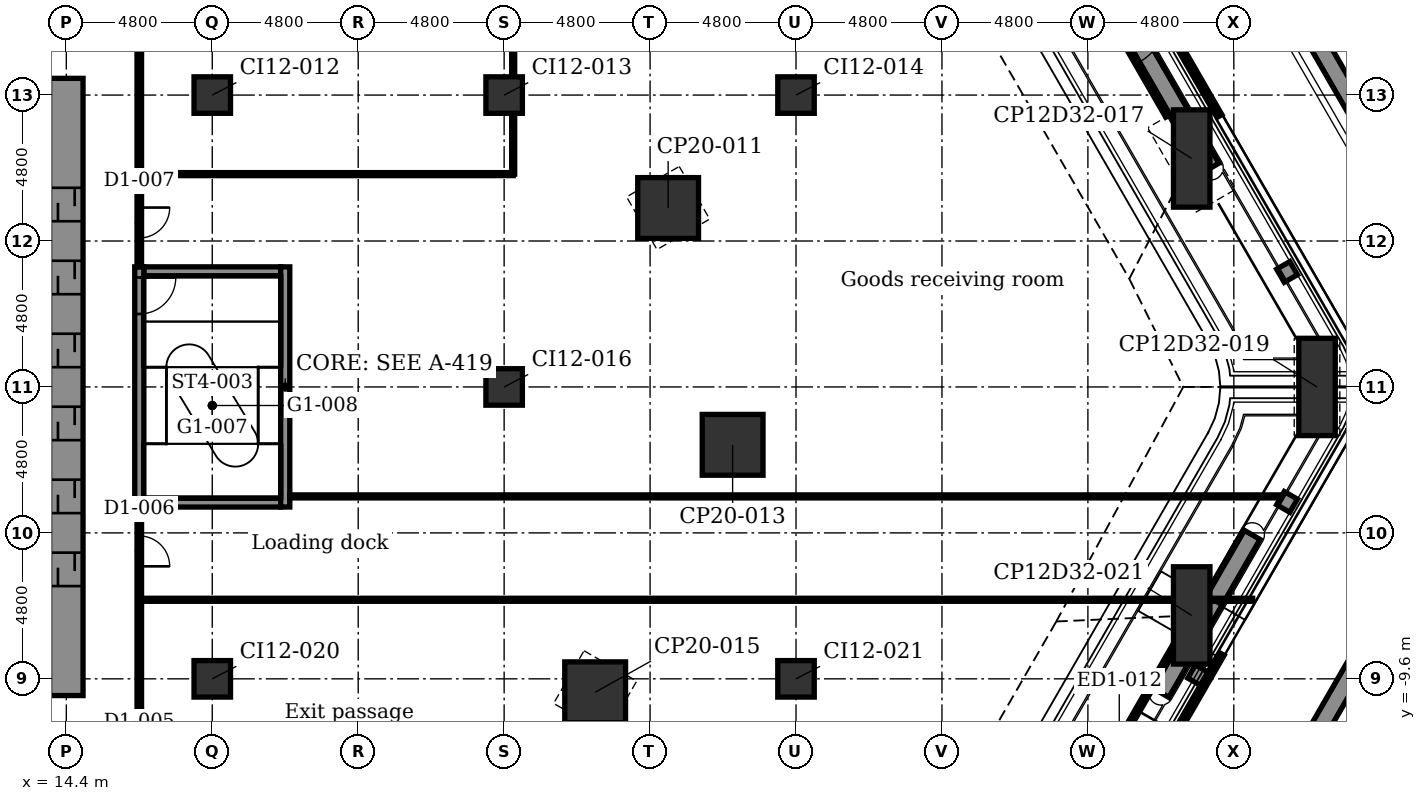
"""IFC4 building model, lengths in metres.
Left out: names, types, materials, properties, quantities, classifications, styles, units other than length and angle.
Written with IfcOpenShell. Run it as: python <this file> out.ifc"""

import sys

from ifc_helpers import new_model, si_unit, direction, frame, frame_2d, origin, origin_2d, place, context, subcontext, project, spatial, rectangle, extrude, element, fill, save


model = new_model("IFC4")
c1 = context("Model", 3, precision=1e-05, world=origin(), true_north=direction((0.0, 1.0)))
c2 = subcontext(c1, "Body", "Model", "MODEL_VIEW")
j1 = project(units=[si_unit("LENGTHUNIT", "METRE"), si_unit("PLANEANGLEUNIT", "RADIAN")], contexts=[c1])
p1 = place(None, origin())
s1 = spatial("IfcSite", under=j1, at=p1, CompositionType="ELEMENT")
p2 = place(p1, origin())
s2 = spatial("IfcBuilding", under=s1, at=p2, CompositionType="ELEMENT")
p3 = place(p2, origin())
s3 = spatial("IfcBuildingStorey", under=s2, at=p3, CompositionType="ELEMENT", Elevation=0.0)
for number, where, z_axis, x_axis in (
    (1, (51.414, 7.514, -0.4), (0.0, 0.0, 1.0), (0.866, 0.5, 0.0)),
    (2, (55.536, 0.0, -0.4), (0.0, 0.0, 1.0), (1.0, 0.0, 0.0)),
    (3, (51.414, -7.514, -0.4), (0.0, 0.0, 1.0), (0.5, 0.866, 0.0)),
):
    element("IfcColumn", number, at=place(p3, frame(where, z_axis=z_axis, x_axis=x_axis)), inside=s3, PredefinedType="COLUMN", context=c2, shape_type="SweptSolid", body=[
        extrude(rectangle(XDim=1.2, YDim=3.2, at=origin_2d()), origin(), (0.0, 0.0, 1.0), 7.1),
    ])
for number, where, z_axis, x_axis in (
    (4, (34.194, 5.885, -0.4), (0.0, 0.0, 1.0), (0.866, 0.5, 0.0)),
    (5, (36.315, -1.904, -0.4), (0.0, 0.0, 1.0), (1.0, 0.0, 0.0)),
    (6, (31.794, -10.042, -0.4), (0.0, 0.0, 1.0), (0.5, 0.866, 0.0)),
):
    element("IfcColumn", number, at=place(p3, frame(where, z_axis=z_axis, x_axis=x_axis)), inside=s3, PredefinedType="COLUMN", context=c2, shape_type="SweptSolid", body=[
        extrude(rectangle(XDim=2.0, YDim=2.0, at=origin_2d()), origin(), (0.0, 0.0, 1.0), 7.1),
    ])
for number, where, z_axis, x_axis in (
    (7, (19.2, -9.6, -0.4), (0.0, 0.0, 1.0), (1.0, 0.0, 0.0)),
    (8, (19.2, 9.6, -0.4), (0.0, 0.0, 1.0), (1.0, 0.0, 0.0)),
    (9, (28.8, 0.0, -0.4), (0.0, 0.0, 1.0), (1.0, 0.0, 0.0)),
    (10, (28.8, 9.6, -0.4), (0.0, 0.0, 1.0), (1.0, 0.0, 0.0)),
    (11, (38.4, -9.6, -0.4), (0.0, 0.0, 1.0), (1.0, 0.0, 0.0)),
    (12, (38.4, 9.6, -0.4), (0.0, 0.0, 1.0), (1.0, 0.0, 0.0)),
):
    element("IfcColumn", number, at=place(p3, frame(where, z_axis=z_axis, x_axis=x_axis)), inside=s3, PredefinedType="COLUMN", context=c2, shape_type="SweptSolid", body=[
        extrude(rectangle(XDim=1.2, YDim=1.2, at=origin_2d()), origin(), (0.0, 0.0, 1.0), 7.1),
    ])
for number, where, z_axis, x_axis in (
    (13, (16.95, -3.8, -0.4), (0.0, 0.0, 1.0), (1.0, 0.0, 0.0)),
    (14, (16.95, 3.8, -0.4), (0.0, 0.0, 1.0), (1.0, 0.0, 0.0)),
):
    element("IfcWall", number, at=place(p3, frame(where, z_axis=z_axis, x_axis=x_axis)), inside=s3, PredefinedType="STANDARD", context=c2, shape_type="SweptSolid", body=[
        extrude(rectangle(XDim=4.5, YDim=0.3, at=frame_2d((2.25, 0.0))), origin(), (0.0, 0.0, 1.0), 7.1),
    ])
p4 = place(p3, frame((14.4, -10.15, -0.4), z_axis=(0.0, 0.0, 1.0), x_axis=(0.0, 1.0, 0.0)))
e15 = element("IfcWall", 15, at=p4, inside=s3, PredefinedType="SHEAR", context=c2, shape_type="SweptSolid", body=[
    extrude(rectangle(XDim=20.3, YDim=1.1, at=frame_2d((10.15, 0.0))), origin(), (0.0, 0.0, 1.0), 7.1),
])
p5 = place(p4, frame((3.6, 0.0, 0.4)))
e16 = element("IfcOpeningElement", 16, at=p5, cuts=e15, PredefinedType="OPENING", context=c2, shape_type="SweptSolid", body=[
    extrude(rectangle(XDim=1.1, YDim=2.1, at=frame_2d((0.55, 1.05))), frame((0.0, 0.56, 0.0), z_axis=(0.0, -1.0, 0.0), x_axis=(1.0, 0.0, 0.0)), (0.0, 0.0, 1.0), 1.12),
])
p6 = place(p4, frame((6.0, 0.0, 0.4)))
e17 = element("IfcOpeningElement", 17, at=p6, cuts=e15, PredefinedType="OPENING", context=c2, shape_type="SweptSolid", body=[
    extrude(rectangle(XDim=1.1, YDim=2.1, at=frame_2d((0.55, 1.05))), frame((0.0, 0.56, 0.0), z_axis=(0.0, -1.0, 0.0), x_axis=(1.0, 0.0, 0.0)), (0.0, 0.0, 1.0), 1.12),
])
p7 = place(p4, frame((8.4, 0.0, 0.4)))
e18 = element("IfcOpeningElement", 18, at=p7, cuts=e15, PredefinedType="OPENING", context=c2, shape_type="SweptSolid", body=[
    extrude(rectangle(XDim=1.1, YDim=2.1, at=frame_2d((0.55, 1.05))), frame((0.0, 0.56, 0.0), z_axis=(0.0, -1.0, 0.0), x_axis=(1.0, 0.0, 0.0)), (0.0, 0.0, 1.0), 1.12),
])
p8 = place(p4, frame((10.8, 0.0, 0.4)))
e19 = element("IfcOpeningElement", 19, at=p8, cuts=e15, PredefinedType="OPENING", context=c2, shape_type="SweptSolid", body=[
    extrude(rectangle(XDim=1.1, YDim=2.1, at=frame_2d((0.55, 1.05))), frame((0.0, 0.56, 0.0), z_axis=(0.0, -1.0, 0.0), x_axis=(1.0, 0.0, 0.0)), (0.0, 0.0, 1.0), 1.12),
])
p9 = place(p4, frame((13.2, 0.0, 0.4)))
e20 = element("IfcOpeningElement", 20, at=p9, cuts=e15, PredefinedType="OPENING", context=c2, shape_type="SweptSolid", body=[
    extrude(rectangle(XDim=1.1, YDim=2.1, at=frame_2d((0.55, 1.05))), frame((0.0, 0.56, 0.0), z_axis=(0.0, -1.0, 0.0), x_axis=(1.0, 0.0, 0.0)), (0.0, 0.0, 1.0), 1.12),
])
p10 = place(p4, frame((15.6, 0.0, 0.4)))
e21 = element("IfcOpeningElement", 21, at=p10, cuts=e15, PredefinedType="OPENING", context=c2, shape_type="SweptSolid", body=[
    extrude(rectangle(XDim=1.1, YDim=2.1, at=frame_2d((0.55, 1.05))), frame((0.0, 0.56, 0.0), z_axis=(0.0, -1.0, 0.0), x_axis=(1.0, 0.0, 0.0)), (0.0, 0.0, 1.0), 1.12),
])
p11 = place(p3, frame((16.8, -3.95, -0.4), z_axis=(0.0, 0.0, 1.0), x_axis=(0.0, 1.0, 0.0)))
e22 = element("IfcWall", 22, at=p11, inside=s3, PredefinedType="STANDARD", context=c2, shape_type="SweptSolid", body=[
    extrude(rectangle(XDim=7.9, YDim=0.3, at=frame_2d((3.95, 0.0))), origin(), (0.0, 0.0, 1.0), 7.1),
])
p12 = place(p11, frame((6.35, 0.0, 0.4)))
e23 = element("IfcOpeningElement", 23, at=p12, cuts=e22, PredefinedType="OPENING", context=c2, shape_type="SweptSolid", body=[
    extrude(rectangle(XDim=1.2, YDim=2.1, at=frame_2d((0.6, 1.05))), frame((0.0, 0.16, 0.0), z_axis=(0.0, -1.0, 0.0), x_axis=(1.0, 0.0, 0.0)), (0.0, 0.0, 1.0), 0.32),
])
p13 = place(p3, frame((21.6, -3.95, -0.4), z_axis=(0.0, 0.0, 1.0), x_axis=(0.0, 1.0, 0.0)))
e24 = element("IfcWall", 24, at=p13, inside=s3, PredefinedType="STANDARD", context=c2, shape_type="SweptSolid", body=[
    extrude(rectangle(XDim=7.9, YDim=0.3, at=frame_2d((3.95, 0.0))), origin(), (0.0, 0.0, 1.0), 7.1),
])
p14 = place(p3, frame((47.433, 14.45, 0.0), z_axis=(0.0, 0.0, 1.0), x_axis=(0.500002207027, -0.866024129553, 0.0)))
e25 = element("IfcWall", 25, at=p14, inside=s3, PredefinedType="PARTITIONING", context=c2, shape_type="SweptSolid", body=[
    extrude(rectangle(XDim=6.396, YDim=0.16, at=frame_2d((3.198, 0.0))), origin(), (0.0, 0.0, 1.0), 6.7),
])
p15 = place(p14, frame((1.998, 0.0, 0.0)))
e26 = element("IfcOpeningElement", 26, at=p15, cuts=e25, PredefinedType="OPENING", context=c2, shape_type="SweptSolid", body=[
    extrude(rectangle(XDim=2.4, YDim=2.4, at=frame_2d((1.2, 1.2))), frame((0.0, 0.09, 0.0), z_axis=(0.0, -1.0, 0.0), x_axis=(1.0, 0.0, 0.0)), (0.0, 0.0, 1.0), 0.18),
])
p16 = place(p3, frame((51.131, -8.045, 0.0), z_axis=(0.0, 0.0, 1.0), x_axis=(-0.49999513524, -0.866028212437, 0.0)))
e27 = element("IfcWall", 27, at=p16, inside=s3, PredefinedType="PARTITIONING", context=c2, shape_type="SweptSolid", body=[
    extrude(rectangle(XDim=8.396, YDim=0.16, at=frame_2d((4.198, 0.0))), origin(), (0.0, 0.0, 1.0), 6.7),
])
p17 = place(p16, frame((2.998, 0.0, 0.0)))
e28 = element("IfcOpeningElement", 28, at=p17, cuts=e27, PredefinedType="OPENING", context=c2, shape_type="SweptSolid", body=[
    extrude(rectangle(XDim=2.4, YDim=2.4, at=frame_2d((1.2, 1.2))), frame((0.0, 0.09, 0.0), z_axis=(0.0, -1.0, 0.0), x_axis=(1.0, 0.0, 0.0)), (0.0, 0.0, 1.0), 0.18),
])
p18 = place(p3, frame((48.289, 15.927, 0.0), z_axis=(0.0, 0.0, 1.0), x_axis=(0.500001755459, -0.866024390267, 0.0)))
e29 = element("IfcWall", 29, at=p18, inside=s3, PredefinedType="PARTITIONING", context=c2, shape_type="SweptSolid", body=[
    extrude(rectangle(XDim=8.096, YDim=0.16, at=frame_2d((4.048, 0.0))), origin(), (0.0, 0.0, 1.0), 6.7),
])
p19 = place(p18, frame((2.848, 0.0, 0.0)))
e30 = element("IfcOpeningElement", 30, at=p19, cuts=e29, PredefinedType="OPENING", context=c2, shape_type="SweptSolid", body=[
    extrude(rectangle(XDim=2.4, YDim=2.4, at=frame_2d((1.2, 1.2))), frame((0.0, 0.09, 0.0), z_axis=(0.0, -1.0, 0.0), x_axis=(1.0, 0.0, 0.0)), (0.0, 0.0, 1.0), 0.18),
])
p20 = place(p3, frame((52.411, -8.787, 0.0), z_axis=(0.0, 0.0, 1.0), x_axis=(-0.499996941814, -0.866027169422, 0.0)))
e31 = element("IfcWall", 31, at=p20, inside=s3, PredefinedType="PARTITIONING", context=c2, shape_type="SweptSolid", body=[
    extrude(rectangle(XDim=8.392, YDim=0.16, at=frame_2d((4.196, 0.0))), origin(), (0.0, 0.0, 1.0), 6.7),
])
p21 = place(p20, frame((2.996, 0.0, 0.0)))
e32 = element("IfcOpeningElement", 32, at=p21, cuts=e31, PredefinedType="OPENING", context=c2, shape_type="SweptSolid", body=[
    extrude(rectangle(XDim=2.4, YDim=2.4, at=frame_2d((1.2, 1.2))), frame((0.0, 0.09, 0.0), z_axis=(0.0, -1.0, 0.0), x_axis=(1.0, 0.0, 0.0)), (0.0, 0.0, 1.0), 0.18),
])
for number, where, z_axis, x_axis in (
    (33, (49.052, 12.406, 7.0), (0.0, 0.0, 1.0), (0.5, -0.866, 0.0)),
    (34, (53.405, -4.865, 7.0), (0.0, 0.0, 1.0), (-0.5, -0.866, 0.0)),
):
    element("IfcWall", number, at=place(p3, frame(where, z_axis=z_axis, x_axis=x_axis)), inside=s3, PredefinedType="USERDEFINED", context=c2, shape_type="SweptSolid", body=[
        extrude(rectangle(XDim=6.0, YDim=0.6, at=frame_2d((3.0, 0.0))), origin(), (0.0, 0.0, 1.0), 0.7),
    ])
for number, where, z_axis, x_axis in (
    (35, (52.077, 17.365, 0.0), (0.0, 0.0, 1.0), (0.5, -0.866, 0.0)),
    (36, (60.577, -2.643, 0.0), (0.0, 0.0, 1.0), (-0.5, -0.866, 0.0)),
):
    element("IfcWall", number, at=place(p3, frame(where, z_axis=z_axis, x_axis=x_axis)), inside=s3, PredefinedType="USERDEFINED", context=c2, shape_type="SweptSolid", body=[
        extrude(rectangle(XDim=12.0, YDim=0.6, at=frame_2d((6.0, 0.0))), origin(), (0.0, 0.0, 1.0), 0.7),
    ])
for number, where, z_axis, x_axis in (
    (37, (54.425, 3.999, 0.0), (0.0, 0.0, 1.0), (0.5, -0.866, 0.0)),
    (38, (54.675, -3.565, 0.0), (0.0, 0.0, 1.0), (-0.5, -0.866, 0.0)),
):
    element("IfcWall", number, at=place(p3, frame(where, z_axis=z_axis, x_axis=x_axis)), inside=s3, PredefinedType="SOLIDWALL", context=c2, shape_type="SweptSolid", body=[
        extrude(rectangle(XDim=0.5, YDim=0.5, at=frame_2d((0.25, 0.0))), origin(), (0.0, 0.0, 1.0), 6.4),
    ])
p22 = place(p3, frame((51.753, -9.268, 0.0), z_axis=(0.0, 0.0, 1.0), x_axis=(-0.500131122175, -0.865949687125, 0.0)))
e39 = element("IfcWall", 39, at=p22, inside=s3, PredefinedType="SOLIDWALL", context=c2, shape_type="SweptSolid", body=[
    extrude(rectangle(XDim=0.5, YDim=0.5, at=frame_2d((0.25, 0.0))), origin(), (0.0, 0.0, 1.0), 6.4),
])
p23 = place(p3, frame((29.097, 7.0, 0.0), z_axis=(0.0, 0.0, 1.0), x_axis=(0.0, 1.0, 0.0)))
e40 = element("IfcWall", 40, at=p23, inside=s3, PredefinedType="PARTITIONING", context=c2, shape_type="SweptSolid", body=[
    extrude(rectangle(XDim=41.911, YDim=0.1, at=frame_2d((20.956, 0.0))), origin(), (0.0, 0.0, 1.0), 6.7),
])
p24 = place(p3, frame((16.8, -14.8, 0.0), z_axis=(0.0, 0.0, 1.0), x_axis=(0.0, 1.0, 0.0)))
e41 = element("IfcWall", 41, at=p24, inside=s3, PredefinedType="PARTITIONING", context=c2, shape_type="SweptSolid", body=[
    extrude(rectangle(XDim=10.85, YDim=0.15, at=frame_2d((5.425, 0.0))), origin(), (0.0, 0.0, 1.0), 6.7),
])
p25 = place(p24, frame((1.9, 0.0, 0.0)))
e42 = element("IfcOpeningElement", 42, at=p25, cuts=e41, PredefinedType="OPENING", context=c2, shape_type="SweptSolid", body=[
    extrude(rectangle(XDim=1.0, YDim=2.1, at=frame_2d((0.5, 1.05))), frame((0.0, 0.085, 0.0), z_axis=(0.0, -1.0, 0.0), x_axis=(1.0, 0.0, 0.0)), (0.0, 0.0, 1.0), 0.17),
])
p26 = place(p24, frame((8.9, 0.0, 0.0)))
e43 = element("IfcOpeningElement", 43, at=p26, cuts=e41, PredefinedType="OPENING", context=c2, shape_type="SweptSolid", body=[
    extrude(rectangle(XDim=1.0, YDim=2.1, at=frame_2d((0.5, 1.05))), frame((0.0, 0.085, 0.0), z_axis=(0.0, -1.0, 0.0), x_axis=(1.0, 0.0, 0.0)), (0.0, 0.0, 1.0), 0.17),
])
p27 = place(p3, frame((16.8, 3.95, 0.0), z_axis=(0.0, 0.0, 1.0), x_axis=(0.0, 1.0, 0.0)))
e44 = element("IfcWall", 44, at=p27, inside=s3, PredefinedType="PARTITIONING", context=c2, shape_type="SweptSolid", body=[
    extrude(rectangle(XDim=12.05, YDim=0.15, at=frame_2d((6.025, 0.0))), origin(), (0.0, 0.0, 1.0), 6.7),
])
p28 = place(p27, frame((0.95, 0.0, 0.0)))
e45 = element("IfcOpeningElement", 45, at=p28, cuts=e44, PredefinedType="OPENING", context=c2, shape_type="SweptSolid", body=[
    extrude(rectangle(XDim=1.0, YDim=2.1, at=frame_2d((0.5, 1.05))), frame((0.0, 0.085, 0.0), z_axis=(0.0, -1.0, 0.0), x_axis=(1.0, 0.0, 0.0)), (0.0, 0.0, 1.0), 0.17),
])
p29 = place(p27, frame((8.55, 0.0, 0.0)))
e46 = element("IfcOpeningElement", 46, at=p29, cuts=e44, PredefinedType="OPENING", context=c2, shape_type="SweptSolid", body=[
    extrude(rectangle(XDim=1.0, YDim=2.1, at=frame_2d((0.5, 1.05))), frame((0.0, 0.085, 0.0), z_axis=(0.0, -1.0, 0.0), x_axis=(1.0, 0.0, 0.0)), (0.0, 0.0, 1.0), 0.17),
])
p30 = place(p3, frame((16.8, -7.0, 0.0), z_axis=(0.0, 0.0, 1.0), x_axis=(1.0, 0.0, 0.0)))
e47 = element("IfcWall", 47, at=p30, inside=s3, PredefinedType="PARTITIONING", context=c2, shape_type="SweptSolid", body=[
    extrude(rectangle(XDim=36.62, YDim=0.1, at=frame_2d((18.31, 0.0))), origin(), (0.0, 0.0, 1.0), 6.7),
])
p31 = place(p3, frame((21.75, -3.6, 0.0), z_axis=(0.0, 0.0, 1.0), x_axis=(1.0, 0.0, 0.0)))
e48 = element("IfcWall", 48, at=p31, inside=s3, PredefinedType="PARTITIONING", context=c2, shape_type="SweptSolid", body=[
    extrude(rectangle(XDim=32.588, YDim=0.1, at=frame_2d((16.294, 0.0))), origin(), (0.0, 0.0, 1.0), 6.7),
])
p32 = place(p3, frame((16.8, 7.0, 0.0), z_axis=(0.0, 0.0, 1.0), x_axis=(1.0, 0.0, 0.0)))
e49 = element("IfcWall", 49, at=p32, inside=s3, PredefinedType="PARTITIONING", context=c2, shape_type="SweptSolid", body=[
    extrude(rectangle(XDim=12.297, YDim=0.1, at=frame_2d((6.148, 0.0))), origin(), (0.0, 0.0, 1.0), 6.7),
])
p33 = place(p15, origin())
e50 = element("IfcDoor", 50, at=p33, inside=s3, OperationType="DOUBLE_DOOR_DOUBLE_SWING", PredefinedType="DOOR", context=c2, shape_type="SweptSolid", body=[
    extrude(rectangle(XDim=2.4, YDim=2.4, at=frame_2d((1.2, 1.2))), frame((0.0, 0.025, 0.0), z_axis=(0.0, -1.0, 0.0), x_axis=(1.0, 0.0, 0.0)), (0.0, 0.0, 1.0), 0.05),
])
fill(e26, e50)
p34 = place(p17, origin())
e51 = element("IfcDoor", 51, at=p34, inside=s3, OperationType="DOUBLE_DOOR_DOUBLE_SWING", PredefinedType="DOOR", context=c2, shape_type="SweptSolid", body=[
    extrude(rectangle(XDim=2.4, YDim=2.4, at=frame_2d((1.2, 1.2))), frame((0.0, 0.025, 0.0), z_axis=(0.0, -1.0, 0.0), x_axis=(1.0, 0.0, 0.0)), (0.0, 0.0, 1.0), 0.05),
])
fill(e28, e51)
p35 = place(p26, frame((1.0, 0.0, 0.0), z_axis=(0.0, 0.0, 1.0), x_axis=(-1.0, 0.0, 0.0)))
e52 = element("IfcDoor", 52, at=p35, inside=s3, OperationType="SINGLE_SWING_LEFT", PredefinedType="DOOR", context=c2, shape_type="SweptSolid", body=[
    extrude(rectangle(XDim=1.0, YDim=2.1, at=frame_2d((0.5, 1.05))), frame((0.0, 0.025, 0.0), z_axis=(0.0, -1.0, 0.0), x_axis=(1.0, 0.0, 0.0)), (0.0, 0.0, 1.0), 0.05),
])
fill(e43, e52)
p36 = place(p28, frame((1.0, 0.0, 0.0), z_axis=(0.0, 0.0, 1.0), x_axis=(-1.0, 0.0, 0.0)))
e53 = element("IfcDoor", 53, at=p36, inside=s3, OperationType="SINGLE_SWING_RIGHT", PredefinedType="DOOR", context=c2, shape_type="SweptSolid", body=[
    extrude(rectangle(XDim=1.0, YDim=2.1, at=frame_2d((0.5, 1.05))), frame((0.0, 0.025, 0.0), z_axis=(0.0, -1.0, 0.0), x_axis=(1.0, 0.0, 0.0)), (0.0, 0.0, 1.0), 0.05),
])
fill(e45, e53)
p37 = place(p5, origin())
e54 = element("IfcDoor", 54, at=p37, inside=s3, OperationType="DOUBLE_DOOR_SLIDING", PredefinedType="DOOR", context=c2, shape_type="SweptSolid", body=[
    extrude(rectangle(XDim=1.1, YDim=2.1, at=frame_2d((0.55, 1.05))), frame((0.0, 0.025, 0.0), z_axis=(0.0, -1.0, 0.0), x_axis=(1.0, 0.0, 0.0)), (0.0, 0.0, 1.0), 0.05),
])
fill(e16, e54)
p38 = place(p6, origin())
e55 = element("IfcDoor", 55, at=p38, inside=s3, OperationType="DOUBLE_DOOR_SLIDING", PredefinedType="DOOR", context=c2, shape_type="SweptSolid", body=[
    extrude(rectangle(XDim=1.1, YDim=2.1, at=frame_2d((0.55, 1.05))), frame((0.0, 0.025, 0.0), z_axis=(0.0, -1.0, 0.0), x_axis=(1.0, 0.0, 0.0)), (0.0, 0.0, 1.0), 0.05),
])
fill(e17, e55)
p39 = place(p7, origin())
e56 = element("IfcDoor", 56, at=p39, inside=s3, OperationType="DOUBLE_DOOR_SLIDING", PredefinedType="DOOR", context=c2, shape_type="SweptSolid", body=[
    extrude(rectangle(XDim=1.1, YDim=2.1, at=frame_2d((0.55, 1.05))), frame((0.0, 0.025, 0.0), z_axis=(0.0, -1.0, 0.0), x_axis=(1.0, 0.0, 0.0)), (0.0, 0.0, 1.0), 0.05),
])
fill(e18, e56)
p40 = place(p8, origin())
e57 = element("IfcDoor", 57, at=p40, inside=s3, OperationType="DOUBLE_DOOR_SLIDING", PredefinedType="DOOR", context=c2, shape_type="SweptSolid", body=[
    extrude(rectangle(XDim=1.1, YDim=2.1, at=frame_2d((0.55, 1.05))), frame((0.0, 0.025, 0.0), z_axis=(0.0, -1.0, 0.0), x_axis=(1.0, 0.0, 0.0)), (0.0, 0.0, 1.0), 0.05),
])
fill(e19, e57)
p41 = place(p9, origin())
e58 = element("IfcDoor", 58, at=p41, inside=s3, OperationType="DOUBLE_DOOR_SLIDING", PredefinedType="DOOR", context=c2, shape_type="SweptSolid", body=[
    extrude(rectangle(XDim=1.1, YDim=2.1, at=frame_2d((0.55, 1.05))), frame((0.0, 0.025, 0.0), z_axis=(0.0, -1.0, 0.0), x_axis=(1.0, 0.0, 0.0)), (0.0, 0.0, 1.0), 0.05),
])
fill(e20, e58)
p42 = place(p10, origin())
e59 = element("IfcDoor", 59, at=p42, inside=s3, OperationType="DOUBLE_DOOR_SLIDING", PredefinedType="DOOR", context=c2, shape_type="SweptSolid", body=[
    extrude(rectangle(XDim=1.1, YDim=2.1, at=frame_2d((0.55, 1.05))), frame((0.0, 0.025, 0.0), z_axis=(0.0, -1.0, 0.0), x_axis=(1.0, 0.0, 0.0)), (0.0, 0.0, 1.0), 0.05),
])
fill(e21, e59)
p43 = place(p12, frame((1.2, 0.0, 0.0), z_axis=(0.0, 0.0, 1.0), x_axis=(-1.0, 0.0, 0.0)))
e60 = element("IfcDoor", 60, at=p43, inside=s3, OperationType="SINGLE_SWING_RIGHT", PredefinedType="DOOR", context=c2, shape_type="SweptSolid", body=[
    extrude(rectangle(XDim=1.2, YDim=2.1, at=frame_2d((0.6, 1.05))), frame((0.0, 0.025, 0.0), z_axis=(0.0, -1.0, 0.0), x_axis=(1.0, 0.0, 0.0)), (0.0, 0.0, 1.0), 0.05),
])
fill(e23, e60)
save(model, sys.argv[1])
